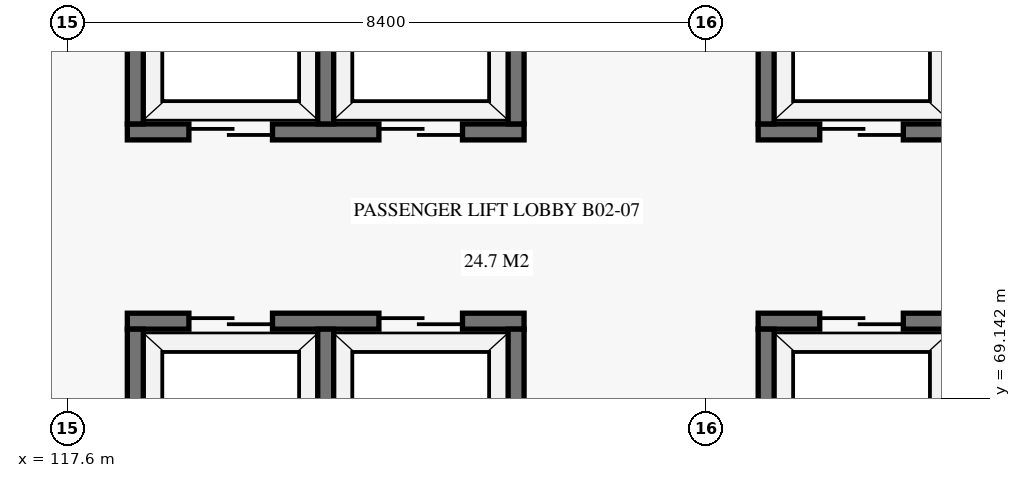
"""IFC4 building model, lengths in metres.
Left out: names, types, materials, properties, quantities, classifications, styles, units other than length and angle.
Written with IfcOpenShell. Run it as: python <this file> out.ifc"""

import sys

from ifc_helpers import new_model, si_unit, direction, frame, frame_2d, origin, place, context, subcontext, project, spatial, rectangle, extrude, element, fill, save


model = new_model("IFC4")
c1 = context("Model", 3, precision=1e-05, world=origin(), true_north=direction((0.0, 1.0)))
c2 = subcontext(c1, "Body", "Model", "MODEL_VIEW")
j1 = project(units=[si_unit("LENGTHUNIT", "METRE"), si_unit("PLANEANGLEUNIT", "RADIAN")], contexts=[c1])
p1 = place(None, origin())
s1 = spatial("IfcSite", under=j1, at=p1, CompositionType="ELEMENT")
p2 = place(p1, origin())
s2 = spatial("IfcBuilding", under=s1, at=p2, CompositionType="ELEMENT")
p3 = place(p2, frame((0.0, 0.0, -8.1)))
s3 = spatial("IfcBuildingStorey", under=s2, at=p3, CompositionType="ELEMENT", Elevation=-8.1)
p4 = place(p3, frame((126.69, 70.155, 0.0), z_axis=(0.0, 0.0, 1.0), x_axis=(1.0, 0.0, 0.0)))
e1 = element("IfcWall", 1, at=p4, inside=s3, PredefinedType="SHEAR", context=c2, shape_type="SweptSolid", body=[
    extrude(rectangle(XDim=5.22, YDim=0.21, at=frame_2d((2.61, 0.0))), origin(), (0.0, 0.0, 1.0), 3.6),
])
p5 = place(p4, frame((0.81, 0.0, 0.0)))
e2 = element("IfcOpeningElement", 2, at=p5, cuts=e1, PredefinedType="OPENING", context=c2, shape_type="SweptSolid", body=[
    extrude(rectangle(XDim=1.1, YDim=2.15, at=frame_2d((0.55, 1.075))), frame((0.0, 0.115, 0.0), z_axis=(0.0, -1.0, 0.0), x_axis=(1.0, 0.0, 0.0)), (0.0, 0.0, 1.0), 0.23),
])
p6 = place(p4, frame((3.31, 0.0, 0.0)))
e3 = element("IfcOpeningElement", 3, at=p6, cuts=e1, PredefinedType="OPENING", context=c2, shape_type="SweptSolid", body=[
    extrude(rectangle(XDim=1.1, YDim=2.15, at=frame_2d((0.55, 1.075))), frame((0.0, 0.115, 0.0), z_axis=(0.0, -1.0, 0.0), x_axis=(1.0, 0.0, 0.0)), (0.0, 0.0, 1.0), 0.23),
])
p7 = place(p3, frame((126.795, 67.85, 0.0), z_axis=(0.0, 0.0, 1.0), x_axis=(0.0, 1.0, 0.0)))
e4 = element("IfcWall", 4, at=p7, inside=s3, PredefinedType="SHEAR", context=c2, shape_type="SweptSolid", body=[
    extrude(rectangle(XDim=2.2, YDim=0.21, at=frame_2d((1.1, 0.0))), origin(), (0.0, 0.0, 1.0), 3.6),
])
p8 = place(p3, frame((126.69, 72.645, 0.0), z_axis=(0.0, 0.0, 1.0), x_axis=(1.0, 0.0, 0.0)))
e5 = element("IfcWall", 5, at=p8, inside=s3, PredefinedType="SHEAR", context=c2, shape_type="SweptSolid", body=[
    extrude(rectangle(XDim=5.22, YDim=0.21, at=frame_2d((2.61, 0.0))), origin(), (0.0, 0.0, 1.0), 3.6),
])
p9 = place(p8, frame((0.81, 0.0, 0.0)))
e6 = element("IfcOpeningElement", 6, at=p9, cuts=e5, PredefinedType="OPENING", context=c2, shape_type="SweptSolid", body=[
    extrude(rectangle(XDim=1.1, YDim=2.15, at=frame_2d((0.55, 1.075))), frame((0.0, 0.115, 0.0), z_axis=(0.0, -1.0, 0.0), x_axis=(1.0, 0.0, 0.0)), (0.0, 0.0, 1.0), 0.23),
])
p10 = place(p8, frame((3.31, 0.0, 0.0)))
e7 = element("IfcOpeningElement", 7, at=p10, cuts=e5, PredefinedType="OPENING", context=c2, shape_type="SweptSolid", body=[
    extrude(rectangle(XDim=1.1, YDim=2.15, at=frame_2d((0.55, 1.075))), frame((0.0, 0.115, 0.0), z_axis=(0.0, -1.0, 0.0), x_axis=(1.0, 0.0, 0.0)), (0.0, 0.0, 1.0), 0.23),
])
p11 = place(p3, frame((126.795, 72.75, 0.0), z_axis=(0.0, 0.0, 1.0), x_axis=(0.0, 1.0, 0.0)))
e8 = element("IfcWall", 8, at=p11, inside=s3, PredefinedType="SHEAR", context=c2, shape_type="SweptSolid", body=[
    extrude(rectangle(XDim=2.2, YDim=0.21, at=frame_2d((1.1, 0.0))), origin(), (0.0, 0.0, 1.0), 3.6),
])
p12 = place(p3, frame((118.39, 70.155, 0.0), z_axis=(0.0, 0.0, 1.0), x_axis=(1.0, 0.0, 0.0)))
e9 = element("IfcWall", 9, at=p12, inside=s3, PredefinedType="SHEAR", context=c2, shape_type="SweptSolid", body=[
    extrude(rectangle(XDim=5.22, YDim=0.21, at=frame_2d((2.61, 0.0))), origin(), (0.0, 0.0, 1.0), 3.6),
])
p13 = place(p12, frame((0.81, 0.0, 0.0)))
e10 = element("IfcOpeningElement", 10, at=p13, cuts=e9, PredefinedType="OPENING", context=c2, shape_type="SweptSolid", body=[
    extrude(rectangle(XDim=1.1, YDim=2.15, at=frame_2d((0.55, 1.075))), frame((0.0, 0.115, 0.0), z_axis=(0.0, -1.0, 0.0), x_axis=(1.0, 0.0, 0.0)), (0.0, 0.0, 1.0), 0.23),
])
p14 = place(p12, frame((3.31, 0.0, 0.0)))
e11 = element("IfcOpeningElement", 11, at=p14, cuts=e9, PredefinedType="OPENING", context=c2, shape_type="SweptSolid", body=[
    extrude(rectangle(XDim=1.1, YDim=2.15, at=frame_2d((0.55, 1.075))), frame((0.0, 0.115, 0.0), z_axis=(0.0, -1.0, 0.0), x_axis=(1.0, 0.0, 0.0)), (0.0, 0.0, 1.0), 0.23),
])
for number, where, z_axis, x_axis in (
    (12, (118.495, 67.85, 0.0), (0.0, 0.0, 1.0), (0.0, 1.0, 0.0)),
    (13, (123.505, 67.85, 0.0), (0.0, 0.0, 1.0), (0.0, 1.0, 0.0)),
    (14, (121.0, 67.85, 0.0), (0.0, 0.0, 1.0), (0.0, 1.0, 0.0)),
):
    element("IfcWall", number, at=place(p3, frame(where, z_axis=z_axis, x_axis=x_axis)), inside=s3, PredefinedType="SHEAR", context=c2, shape_type="SweptSolid", body=[
        extrude(rectangle(XDim=2.2, YDim=0.21, at=frame_2d((1.1, 0.0))), origin(), (0.0, 0.0, 1.0), 3.6),
    ])
p15 = place(p3, frame((118.39, 72.645, 0.0), z_axis=(0.0, 0.0, 1.0), x_axis=(1.0, 0.0, 0.0)))
e15 = element("IfcWall", 15, at=p15, inside=s3, PredefinedType="SHEAR", context=c2, shape_type="SweptSolid", body=[
    extrude(rectangle(XDim=5.22, YDim=0.21, at=frame_2d((2.61, 0.0))), origin(), (0.0, 0.0, 1.0), 3.6),
])
p16 = place(p15, frame((0.81, 0.0, 0.0)))
e16 = element("IfcOpeningElement", 16, at=p16, cuts=e15, PredefinedType="OPENING", context=c2, shape_type="SweptSolid", body=[
    extrude(rectangle(XDim=1.1, YDim=2.15, at=frame_2d((0.55, 1.075))), frame((0.0, 0.115, 0.0), z_axis=(0.0, -1.0, 0.0), x_axis=(1.0, 0.0, 0.0)), (0.0, 0.0, 1.0), 0.23),
])
p17 = place(p15, frame((3.31, 0.0, 0.0)))
e17 = element("IfcOpeningElement", 17, at=p17, cuts=e15, PredefinedType="OPENING", context=c2, shape_type="SweptSolid", body=[
    extrude(rectangle(XDim=1.1, YDim=2.15, at=frame_2d((0.55, 1.075))), frame((0.0, 0.115, 0.0), z_axis=(0.0, -1.0, 0.0), x_axis=(1.0, 0.0, 0.0)), (0.0, 0.0, 1.0), 0.23),
])
for number, where, z_axis, x_axis in (
    (18, (118.495, 72.75, 0.0), (0.0, 0.0, 1.0), (0.0, 1.0, 0.0)),
    (19, (123.505, 72.75, 0.0), (0.0, 0.0, 1.0), (0.0, 1.0, 0.0)),
    (20, (121.0, 72.75, 0.0), (0.0, 0.0, 1.0), (0.0, 1.0, 0.0)),
):
    element("IfcWall", number, at=place(p3, frame(where, z_axis=z_axis, x_axis=x_axis)), inside=s3, PredefinedType="SHEAR", context=c2, shape_type="SweptSolid", body=[
        extrude(rectangle(XDim=2.2, YDim=0.21, at=frame_2d((1.1, 0.0))), origin(), (0.0, 0.0, 1.0), 3.6),
    ])
p18 = place(p5, origin())
e21 = element("IfcDoor", 21, at=p18, inside=s3, OperationType="DOUBLE_DOOR_SLIDING", PredefinedType="DOOR", context=c2, shape_type="SweptSolid", body=[
    extrude(rectangle(XDim=1.1, YDim=2.15, at=frame_2d((0.55, 1.075))), frame((0.0, 0.025, 0.0), z_axis=(0.0, -1.0, 0.0), x_axis=(1.0, 0.0, 0.0)), (0.0, 0.0, 1.0), 0.05),
])
fill(e2, e21)
p19 = place(p9, origin())
e22 = element("IfcDoor", 22, at=p19, inside=s3, OperationType="DOUBLE_DOOR_SLIDING", PredefinedType="DOOR", context=c2, shape_type="SweptSolid", body=[
    extrude(rectangle(XDim=1.1, YDim=2.15, at=frame_2d((0.55, 1.075))), frame((0.0, 0.025, 0.0), z_axis=(0.0, -1.0, 0.0), x_axis=(1.0, 0.0, 0.0)), (0.0, 0.0, 1.0), 0.05),
])
fill(e6, e22)
p20 = place(p13, origin())
e23 = element("IfcDoor", 23, at=p20, inside=s3, OperationType="DOUBLE_DOOR_SLIDING", PredefinedType="DOOR", context=c2, shape_type="SweptSolid", body=[
    extrude(rectangle(XDim=1.1, YDim=2.15, at=frame_2d((0.55, 1.075))), frame((0.0, 0.025, 0.0), z_axis=(0.0, -1.0, 0.0), x_axis=(1.0, 0.0, 0.0)), (0.0, 0.0, 1.0), 0.05),
])
fill(e10, e23)
p21 = place(p14, origin())
e24 = element("IfcDoor", 24, at=p21, inside=s3, OperationType="DOUBLE_DOOR_SLIDING", PredefinedType="DOOR", context=c2, shape_type="SweptSolid", body=[
    extrude(rectangle(XDim=1.1, YDim=2.15, at=frame_2d((0.55, 1.075))), frame((0.0, 0.025, 0.0), z_axis=(0.0, -1.0, 0.0), x_axis=(1.0, 0.0, 0.0)), (0.0, 0.0, 1.0), 0.05),
])
fill(e11, e24)
p22 = place(p16, origin())
e25 = element("IfcDoor", 25, at=p22, inside=s3, OperationType="DOUBLE_DOOR_SLIDING", PredefinedType="DOOR", context=c2, shape_type="SweptSolid", body=[
    extrude(rectangle(XDim=1.1, YDim=2.15, at=frame_2d((0.55, 1.075))), frame((0.0, 0.025, 0.0), z_axis=(0.0, -1.0, 0.0), x_axis=(1.0, 0.0, 0.0)), (0.0, 0.0, 1.0), 0.05),
])
fill(e16, e25)
p23 = place(p17, origin())
e26 = element("IfcDoor", 26, at=p23, inside=s3, OperationType="DOUBLE_DOOR_SLIDING", PredefinedType="DOOR", context=c2, shape_type="SweptSolid", body=[
    extrude(rectangle(XDim=1.1, YDim=2.15, at=frame_2d((0.55, 1.075))), frame((0.0, 0.025, 0.0), z_axis=(0.0, -1.0, 0.0), x_axis=(1.0, 0.0, 0.0)), (0.0, 0.0, 1.0), 0.05),
])
fill(e17, e26)
save(model, sys.argv[1])
